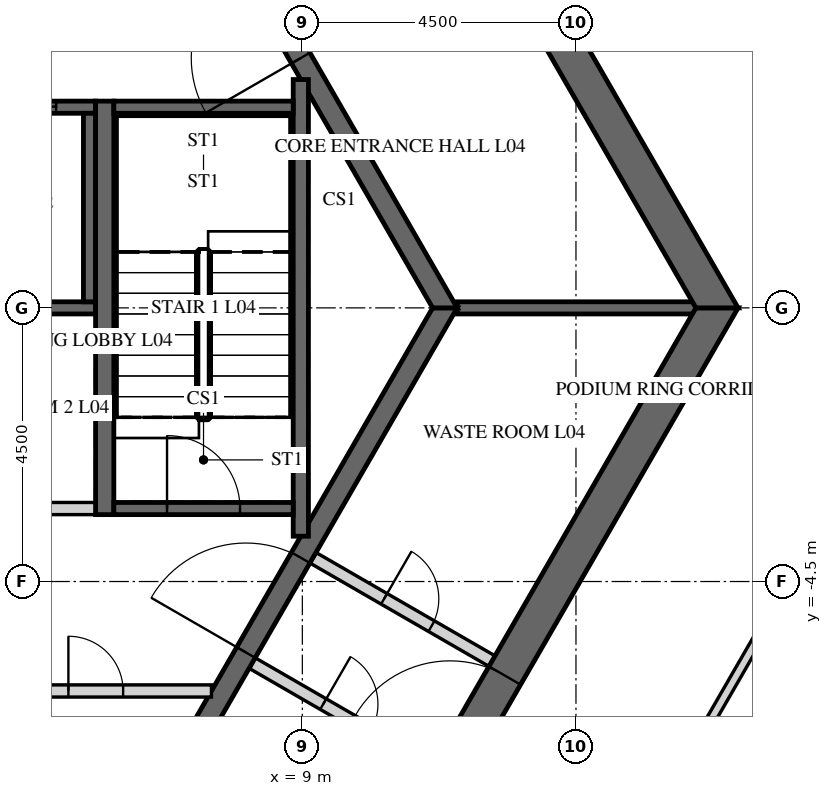
"""IFC4 building model, lengths in metres.
Left out: names, types, materials, properties, quantities, classifications, styles, units other than length and angle.
Written with IfcOpenShell. Run it as: python <this file> out.ifc"""

import sys

from ifc_helpers import new_model, si_unit, direction, frame, frame_2d, origin, place, context, subcontext, project, spatial, polyline, rectangle, outline, extrude, element, fill, save


model = new_model("IFC4")
c1 = context("Model", 3, precision=1e-05, world=origin(), true_north=direction((0.0, 1.0)))
c2 = subcontext(c1, "Body", "Model", "MODEL_VIEW")
j1 = project(units=[si_unit("LENGTHUNIT", "METRE"), si_unit("PLANEANGLEUNIT", "RADIAN")], contexts=[c1])
p1 = place(None, origin())
s1 = spatial("IfcSite", under=j1, at=p1, CompositionType="ELEMENT")
p2 = place(p1, origin())
s2 = spatial("IfcBuilding", under=s1, at=p2, CompositionType="ELEMENT")
p3 = place(p2, frame((0.0, 0.0, 26.0)))
s3 = spatial("IfcBuildingStorey", under=s2, at=p3, CompositionType="ELEMENT", Elevation=26.0)
p4 = place(p3, frame((7.91, -13.7, -0.25), z_axis=(0.0, 0.0, 1.0), x_axis=(0.499999880136, 0.866025472988, 0.0)))
e1 = element("IfcWall", 1, at=p4, inside=s3, PredefinedType="SHEAR", context=c2, shape_type="SweptSolid", body=[
    extrude(outline(polyline([(-0.173, -0.3), (15.993, -0.3), (15.646, 0.3), (0.173, 0.3), (-0.173, -0.3)])), origin(), (0.0, 0.0, 1.0), 5.45),
])
p5 = place(p4, frame((7.039, 0.0, 0.25)))
e2 = element("IfcOpeningElement", 2, at=p5, cuts=e1, PredefinedType="OPENING", context=c2, shape_type="SweptSolid", body=[
    extrude(rectangle(XDim=1.8, YDim=2.4, at=frame_2d((0.9, 1.2))), frame((0.0, 0.31, 0.0), z_axis=(0.0, -1.0, 0.0), x_axis=(1.0, 0.0, 0.0)), (0.0, 0.0, 1.0), 0.62),
])
p6 = place(p3, frame((15.819, 0.0, -0.25), z_axis=(0.0, 0.0, 1.0), x_axis=(-0.499999880136, 0.866025472988, 0.0)))
e3 = element("IfcWall", 3, at=p6, inside=s3, PredefinedType="SHEAR", context=c2, shape_type="SweptSolid", body=[
    extrude(outline(polyline([(-0.173, -0.3), (15.993, -0.3), (15.646, 0.3), (0.173, 0.3), (-0.173, -0.3)])), origin(), (0.0, 0.0, 1.0), 5.45),
])
p7 = place(p6, frame((6.981, 0.0, 0.25)))
e4 = element("IfcOpeningElement", 4, at=p7, cuts=e3, PredefinedType="OPENING", context=c2, shape_type="SweptSolid", body=[
    extrude(rectangle(XDim=1.8, YDim=2.4, at=frame_2d((0.9, 1.2))), frame((0.0, 0.31, 0.0), z_axis=(0.0, -1.0, 0.0), x_axis=(1.0, 0.0, 0.0)), (0.0, 0.0, 1.0), 0.62),
])
p8 = place(p3, frame((5.673, -9.825, -0.25), z_axis=(0.0, 0.0, 1.0), x_axis=(0.499995046907, 0.866028263435, 0.0)))
e5 = element("IfcWall", 5, at=p8, inside=s3, PredefinedType="SHEAR", context=c2, shape_type="SweptSolid", body=[
    extrude(outline(polyline([(-0.101, -0.175), (11.446, -0.175), (11.244, 0.175), (0.101, 0.175), (-0.101, -0.175)])), origin(), (0.0, 0.0, 1.0), 5.45),
])
p9 = place(p8, frame((4.801, 0.0, 0.25)))
e6 = element("IfcOpeningElement", 6, at=p9, cuts=e5, PredefinedType="OPENING", context=c2, shape_type="SweptSolid", body=[
    extrude(rectangle(XDim=1.8, YDim=2.4, at=frame_2d((0.9, 1.2))), frame((0.0, 0.185, 0.0), z_axis=(0.0, -1.0, 0.0), x_axis=(1.0, 0.0, 0.0)), (0.0, 0.0, 1.0), 0.37),
])
p10 = place(p3, frame((11.345, 0.0, -0.25), z_axis=(0.0, 0.0, 1.0), x_axis=(-0.499995046907, 0.866028263435, 0.0)))
e7 = element("IfcWall", 7, at=p10, inside=s3, PredefinedType="SHEAR", context=c2, shape_type="SweptSolid", body=[
    extrude(outline(polyline([(-0.101, -0.175), (11.446, -0.175), (11.244, 0.175), (0.101, 0.175), (-0.101, -0.175)])), origin(), (0.0, 0.0, 1.0), 5.45),
])
p11 = place(p10, frame((4.744, 0.0, 0.25)))
e8 = element("IfcOpeningElement", 8, at=p11, cuts=e7, PredefinedType="OPENING", context=c2, shape_type="SweptSolid", body=[
    extrude(rectangle(XDim=1.8, YDim=2.4, at=frame_2d((0.9, 1.2))), frame((0.0, 0.185, 0.0), z_axis=(0.0, -1.0, 0.0), x_axis=(1.0, 0.0, 0.0)), (0.0, 0.0, 1.0), 0.37),
])
p12 = place(p3, frame((-5.6, 3.3, -0.25), z_axis=(0.0, 0.0, 1.0), x_axis=(1.0, 0.0, 0.0)))
e9 = element("IfcWall", 9, at=p12, inside=s3, PredefinedType="SHEAR", context=c2, shape_type="SweptSolid", body=[
    extrude(rectangle(XDim=11.2, YDim=0.2, at=frame_2d((5.6, 0.0))), origin(), (0.0, 0.0, 1.0), 5.5),
])
p13 = place(p12, frame((0.65, 0.0, 0.25)))
e10 = element("IfcOpeningElement", 10, at=p13, cuts=e9, PredefinedType="OPENING", context=c2, shape_type="SweptSolid", body=[
    extrude(rectangle(XDim=1.1, YDim=2.1, at=frame_2d((0.55, 1.05))), frame((0.0, 0.11, 0.0), z_axis=(0.0, -1.0, 0.0), x_axis=(1.0, 0.0, 0.0)), (0.0, 0.0, 1.0), 0.22),
])
p14 = place(p12, frame((2.85, 0.0, 0.25)))
e11 = element("IfcOpeningElement", 11, at=p14, cuts=e9, PredefinedType="OPENING", context=c2, shape_type="SweptSolid", body=[
    extrude(rectangle(XDim=1.1, YDim=2.1, at=frame_2d((0.55, 1.05))), frame((0.0, 0.11, 0.0), z_axis=(0.0, -1.0, 0.0), x_axis=(1.0, 0.0, 0.0)), (0.0, 0.0, 1.0), 0.22),
])
p15 = place(p12, frame((5.05, 0.0, 0.25)))
e12 = element("IfcOpeningElement", 12, at=p15, cuts=e9, PredefinedType="OPENING", context=c2, shape_type="SweptSolid", body=[
    extrude(rectangle(XDim=1.1, YDim=2.1, at=frame_2d((0.55, 1.05))), frame((0.0, 0.11, 0.0), z_axis=(0.0, -1.0, 0.0), x_axis=(1.0, 0.0, 0.0)), (0.0, 0.0, 1.0), 0.22),
])
p16 = place(p12, frame((7.25, 0.0, 0.25)))
e13 = element("IfcOpeningElement", 13, at=p16, cuts=e9, PredefinedType="OPENING", context=c2, shape_type="SweptSolid", body=[
    extrude(rectangle(XDim=1.1, YDim=2.1, at=frame_2d((0.55, 1.05))), frame((0.0, 0.11, 0.0), z_axis=(0.0, -1.0, 0.0), x_axis=(1.0, 0.0, 0.0)), (0.0, 0.0, 1.0), 0.22),
])
p17 = place(p12, frame((9.45, 0.0, 0.25)))
e14 = element("IfcOpeningElement", 14, at=p17, cuts=e9, PredefinedType="OPENING", context=c2, shape_type="SweptSolid", body=[
    extrude(rectangle(XDim=1.1, YDim=2.1, at=frame_2d((0.55, 1.05))), frame((0.0, 0.11, 0.0), z_axis=(0.0, -1.0, 0.0), x_axis=(1.0, 0.0, 0.0)), (0.0, 0.0, 1.0), 0.22),
])
p18 = place(p3, frame((-5.6, 0.0, -0.25), z_axis=(0.0, 0.0, 1.0), x_axis=(1.0, 0.0, 0.0)))
e15 = element("IfcWall", 15, at=p18, inside=s3, PredefinedType="SHEAR", context=c2, shape_type="SweptSolid", body=[
    extrude(rectangle(XDim=11.2, YDim=0.2, at=frame_2d((5.6, 0.0))), origin(), (0.0, 0.0, 1.0), 5.5),
])
p19 = place(p3, frame((5.5, 0.1, -0.25), z_axis=(0.0, 0.0, 1.0), x_axis=(0.0, 1.0, 0.0)))
e16 = element("IfcWall", 16, at=p19, inside=s3, PredefinedType="SHEAR", context=c2, shape_type="SweptSolid", body=[
    extrude(rectangle(XDim=3.1, YDim=0.2, at=frame_2d((1.55, 0.0))), origin(), (0.0, 0.0, 1.0), 5.5),
])
p20 = place(p3, frame((0.1, -3.3, 0.0), z_axis=(0.0, 0.0, 1.0), x_axis=(1.0, 0.0, 0.0)))
e17 = element("IfcWall", 17, at=p20, inside=s3, PredefinedType="PARTITIONING", context=c2, shape_type="SweptSolid", body=[
    extrude(rectangle(XDim=5.5, YDim=0.2, at=frame_2d((2.75, 0.0))), origin(), (0.0, 0.0, 1.0), 5.25),
])
p21 = place(p20, frame((2.3, 0.0, 0.0)))
e18 = element("IfcOpeningElement", 18, at=p21, cuts=e17, PredefinedType="OPENING", context=c2, shape_type="SweptSolid", body=[
    extrude(rectangle(XDim=0.9, YDim=2.1, at=frame_2d((0.45, 1.05))), frame((0.0, 0.11, 0.0), z_axis=(0.0, -1.0, 0.0), x_axis=(1.0, 0.0, 0.0)), (0.0, 0.0, 1.0), 0.22),
])
p22 = place(p3, frame((3.7, -6.3, 0.0), z_axis=(0.0, 0.0, 1.0), x_axis=(1.0, 0.0, 0.0)))
e19 = element("IfcWall", 19, at=p22, inside=s3, PredefinedType="PARTITIONING", context=c2, shape_type="SweptSolid", body=[
    extrude(rectangle(XDim=3.806, YDim=0.2, at=frame_2d((1.903, 0.0))), origin(), (0.0, 0.0, 1.0), 5.25),
])
p23 = place(p22, frame((1.453, 0.0, 0.0)))
e20 = element("IfcOpeningElement", 20, at=p23, cuts=e19, PredefinedType="OPENING", context=c2, shape_type="SweptSolid", body=[
    extrude(rectangle(XDim=0.9, YDim=2.1, at=frame_2d((0.45, 1.05))), frame((0.0, 0.11, 0.0), z_axis=(0.0, -1.0, 0.0), x_axis=(1.0, 0.0, 0.0)), (0.0, 0.0, 1.0), 0.22),
])
p24 = place(p3, frame((11.547, 0.0, -0.25), z_axis=(0.0, 0.0, 1.0), x_axis=(1.0, 0.0, 0.0)))
e21 = element("IfcWall", 21, at=p24, inside=s3, PredefinedType="SHEAR", context=c2, shape_type="SweptSolid", body=[
    extrude(rectangle(XDim=3.926, YDim=0.2, at=frame_2d((1.963, 0.0))), origin(), (0.0, 0.0, 1.0), 5.45),
])
p25 = place(p3, frame((9.175, -4.109, 0.0), z_axis=(0.0, 0.0, 1.0), x_axis=(0.865989465428, -0.500062241894, 0.0)))
e22 = element("IfcWall", 22, at=p25, inside=s3, PredefinedType="PARTITIONING", context=c2, shape_type="SweptSolid", body=[
    extrude(rectangle(XDim=3.4, YDim=0.2, at=frame_2d((1.7, 0.0))), origin(), (0.0, 0.0, 1.0), 5.25),
])
p26 = place(p25, frame((1.351, 0.0, 0.0)))
e23 = element("IfcOpeningElement", 23, at=p26, cuts=e22, PredefinedType="OPENING", context=c2, shape_type="SweptSolid", body=[
    extrude(rectangle(XDim=0.9, YDim=2.1, at=frame_2d((0.45, 1.05))), frame((0.0, 0.11, 0.0), z_axis=(0.0, -1.0, 0.0), x_axis=(1.0, 0.0, 0.0)), (0.0, 0.0, 1.0), 0.22),
])
p27 = place(p3, frame((8.175, -5.841, 0.0), z_axis=(0.0, 0.0, 1.0), x_axis=(0.866020560687, -0.500008388397, 0.0)))
e24 = element("IfcWall", 24, at=p27, inside=s3, PredefinedType="PARTITIONING", context=c2, shape_type="SweptSolid", body=[
    extrude(rectangle(XDim=3.4, YDim=0.2, at=frame_2d((1.7, 0.0))), origin(), (0.0, 0.0, 1.0), 5.25),
])
p28 = place(p27, frame((1.35, 0.0, 0.0)))
e25 = element("IfcOpeningElement", 25, at=p28, cuts=e24, PredefinedType="OPENING", context=c2, shape_type="SweptSolid", body=[
    extrude(rectangle(XDim=0.9, YDim=2.1, at=frame_2d((0.45, 1.05))), frame((0.0, 0.11, 0.0), z_axis=(0.0, -1.0, 0.0), x_axis=(1.0, 0.0, 0.0)), (0.0, 0.0, 1.0), 0.22),
])
p29 = place(p3, frame((5.75, -3.4, -0.25), z_axis=(0.0, 0.0, 1.0), x_axis=(0.0, 1.0, 0.0)))
e26 = element("IfcWall", 26, at=p29, inside=s3, PredefinedType="SHEAR", context=c2, shape_type="SweptSolid", body=[
    extrude(rectangle(XDim=6.8, YDim=0.3, at=frame_2d((3.4, 0.0))), origin(), (0.0, 0.0, 1.0), 5.5),
])
p30 = place(p3, frame((8.975, -3.755, -0.25), z_axis=(0.0, 0.0, 1.0), x_axis=(0.0, 1.0, 0.0)))
e27 = element("IfcWall", 27, at=p30, inside=s3, PredefinedType="SHEAR", context=c2, shape_type="SweptSolid", body=[
    extrude(rectangle(XDim=7.51, YDim=0.25, at=frame_2d((3.755, 0.0))), origin(), (0.0, 0.0, 1.0), 5.5),
])
p31 = place(p3, frame((5.9, 3.3, -0.25), z_axis=(0.0, 0.0, 1.0), x_axis=(1.0, 0.0, 0.0)))
e28 = element("IfcWall", 28, at=p31, inside=s3, PredefinedType="SHEAR", context=c2, shape_type="SweptSolid", body=[
    extrude(rectangle(XDim=2.95, YDim=0.2, at=frame_2d((1.475, 0.0))), origin(), (0.0, 0.0, 1.0), 5.5),
])
p32 = place(p3, frame((5.9, -3.3, -0.25), z_axis=(0.0, 0.0, 1.0), x_axis=(1.0, 0.0, 0.0)))
e29 = element("IfcWall", 29, at=p32, inside=s3, PredefinedType="SHEAR", context=c2, shape_type="SweptSolid", body=[
    extrude(rectangle(XDim=2.95, YDim=0.2, at=frame_2d((1.475, 0.0))), origin(), (0.0, 0.0, 1.0), 5.5),
])
p33 = place(p32, frame((0.875, 0.0, 0.25)))
e30 = element("IfcOpeningElement", 30, at=p33, cuts=e29, PredefinedType="OPENING", context=c2, shape_type="SweptSolid", body=[
    extrude(rectangle(XDim=1.2, YDim=2.4, at=frame_2d((0.6, 1.2))), frame((0.0, 0.11, 0.0), z_axis=(0.0, -1.0, 0.0), x_axis=(1.0, 0.0, 0.0)), (0.0, 0.0, 1.0), 0.22),
])
p34 = place(p3, frame((18.692, -1.625, 0.0), z_axis=(0.0, 0.0, 1.0), x_axis=(-0.500053906551, -0.865994278585, 0.0)))
e31 = element("IfcWall", 31, at=p34, inside=s3, PredefinedType="PARTITIONING", context=c2, shape_type="SweptSolid", body=[
    extrude(rectangle(XDim=6.928, YDim=0.15, at=frame_2d((3.464, 0.0))), origin(), (0.0, 0.0, 1.0), 5.2),
])
p35 = place(p34, frame((2.564, 0.0, 0.0)))
e32 = element("IfcOpeningElement", 32, at=p35, cuts=e31, PredefinedType="OPENING", context=c2, shape_type="SweptSolid", body=[
    extrude(rectangle(XDim=1.8, YDim=2.1, at=frame_2d((0.9, 1.05))), frame((0.0, 0.085, 0.0), z_axis=(0.0, -1.0, 0.0), x_axis=(1.0, 0.0, 0.0)), (0.0, 0.0, 1.0), 0.17),
])
p36 = place(p3, frame((14.723, 8.5, 0.0), z_axis=(0.0, 0.0, 1.0), x_axis=(0.499952654668, -0.866052736899, 0.0)))
e33 = element("IfcWall", 33, at=p36, inside=s3, PredefinedType="PARTITIONING", context=c2, shape_type="SweptSolid", body=[
    extrude(rectangle(XDim=5.233, YDim=0.15, at=frame_2d((2.616, 0.0))), origin(), (0.0, 0.0, 1.0), 5.2),
])
p37 = place(p36, frame((1.716, 0.0, 0.0)))
e34 = element("IfcOpeningElement", 34, at=p37, cuts=e33, PredefinedType="OPENING", context=c2, shape_type="SweptSolid", body=[
    extrude(rectangle(XDim=1.8, YDim=2.1, at=frame_2d((0.9, 1.05))), frame((0.0, 0.085, 0.0), z_axis=(0.0, -1.0, 0.0), x_axis=(1.0, 0.0, 0.0)), (0.0, 0.0, 1.0), 0.17),
])
p38 = place(p5, origin())
e35 = element("IfcDoor", 35, at=p38, inside=s3, OperationType="DOUBLE_DOOR_SINGLE_SWING", PredefinedType="DOOR", context=c2, shape_type="SweptSolid", body=[
    extrude(rectangle(XDim=1.8, YDim=2.4, at=frame_2d((0.9, 1.2))), frame((0.0, 0.025, 0.0), z_axis=(0.0, -1.0, 0.0), x_axis=(1.0, 0.0, 0.0)), (0.0, 0.0, 1.0), 0.05),
])
fill(e2, e35)
p39 = place(p11, origin())
e36 = element("IfcDoor", 36, at=p39, inside=s3, OperationType="DOUBLE_DOOR_SINGLE_SWING", PredefinedType="DOOR", context=c2, shape_type="SweptSolid", body=[
    extrude(rectangle(XDim=1.8, YDim=2.4, at=frame_2d((0.9, 1.2))), frame((0.0, 0.025, 0.0), z_axis=(0.0, -1.0, 0.0), x_axis=(1.0, 0.0, 0.0)), (0.0, 0.0, 1.0), 0.05),
])
fill(e8, e36)
p40 = place(p9, origin())
e37 = element("IfcDoor", 37, at=p40, inside=s3, OperationType="DOUBLE_DOOR_SINGLE_SWING", PredefinedType="DOOR", context=c2, shape_type="SweptSolid", body=[
    extrude(rectangle(XDim=1.8, YDim=2.4, at=frame_2d((0.9, 1.2))), frame((0.0, 0.025, 0.0), z_axis=(0.0, -1.0, 0.0), x_axis=(1.0, 0.0, 0.0)), (0.0, 0.0, 1.0), 0.05),
])
fill(e6, e37)
p41 = place(p23, origin())
e38 = element("IfcDoor", 38, at=p41, inside=s3, OperationType="SINGLE_SWING_LEFT", PredefinedType="DOOR", context=c2, shape_type="SweptSolid", body=[
    extrude(rectangle(XDim=0.9, YDim=2.1, at=frame_2d((0.45, 1.05))), frame((0.0, 0.025, 0.0), z_axis=(0.0, -1.0, 0.0), x_axis=(1.0, 0.0, 0.0)), (0.0, 0.0, 1.0), 0.05),
])
fill(e20, e38)
p42 = place(p26, origin())
e39 = element("IfcDoor", 39, at=p42, inside=s3, OperationType="SINGLE_SWING_LEFT", PredefinedType="DOOR", context=c2, shape_type="SweptSolid", body=[
    extrude(rectangle(XDim=0.9, YDim=2.1, at=frame_2d((0.45, 1.05))), frame((0.0, 0.025, 0.0), z_axis=(0.0, -1.0, 0.0), x_axis=(1.0, 0.0, 0.0)), (0.0, 0.0, 1.0), 0.05),
])
fill(e23, e39)
p43 = place(p28, origin())
e40 = element("IfcDoor", 40, at=p43, inside=s3, OperationType="SINGLE_SWING_LEFT", PredefinedType="DOOR", context=c2, shape_type="SweptSolid", body=[
    extrude(rectangle(XDim=0.9, YDim=2.1, at=frame_2d((0.45, 1.05))), frame((0.0, 0.025, 0.0), z_axis=(0.0, -1.0, 0.0), x_axis=(1.0, 0.0, 0.0)), (0.0, 0.0, 1.0), 0.05),
])
fill(e25, e40)
p44 = place(p33, origin())
e41 = element("IfcDoor", 41, at=p44, inside=s3, OperationType="SINGLE_SWING_LEFT", PredefinedType="DOOR", context=c2, shape_type="SweptSolid", body=[
    extrude(rectangle(XDim=1.2, YDim=2.4, at=frame_2d((0.6, 1.2))), frame((0.0, 0.025, 0.0), z_axis=(0.0, -1.0, 0.0), x_axis=(1.0, 0.0, 0.0)), (0.0, 0.0, 1.0), 0.05),
])
fill(e30, e41)
p45 = place(p17, origin())
e42 = element("IfcDoor", 42, at=p45, inside=s3, OperationType="SLIDING_TO_LEFT", PredefinedType="DOOR", context=c2, shape_type="SweptSolid", body=[
    extrude(rectangle(XDim=1.1, YDim=2.1, at=frame_2d((0.55, 1.05))), frame((0.0, 0.025, 0.0), z_axis=(0.0, -1.0, 0.0), x_axis=(1.0, 0.0, 0.0)), (0.0, 0.0, 1.0), 0.05),
])
fill(e14, e42)
save(model, sys.argv[1])
